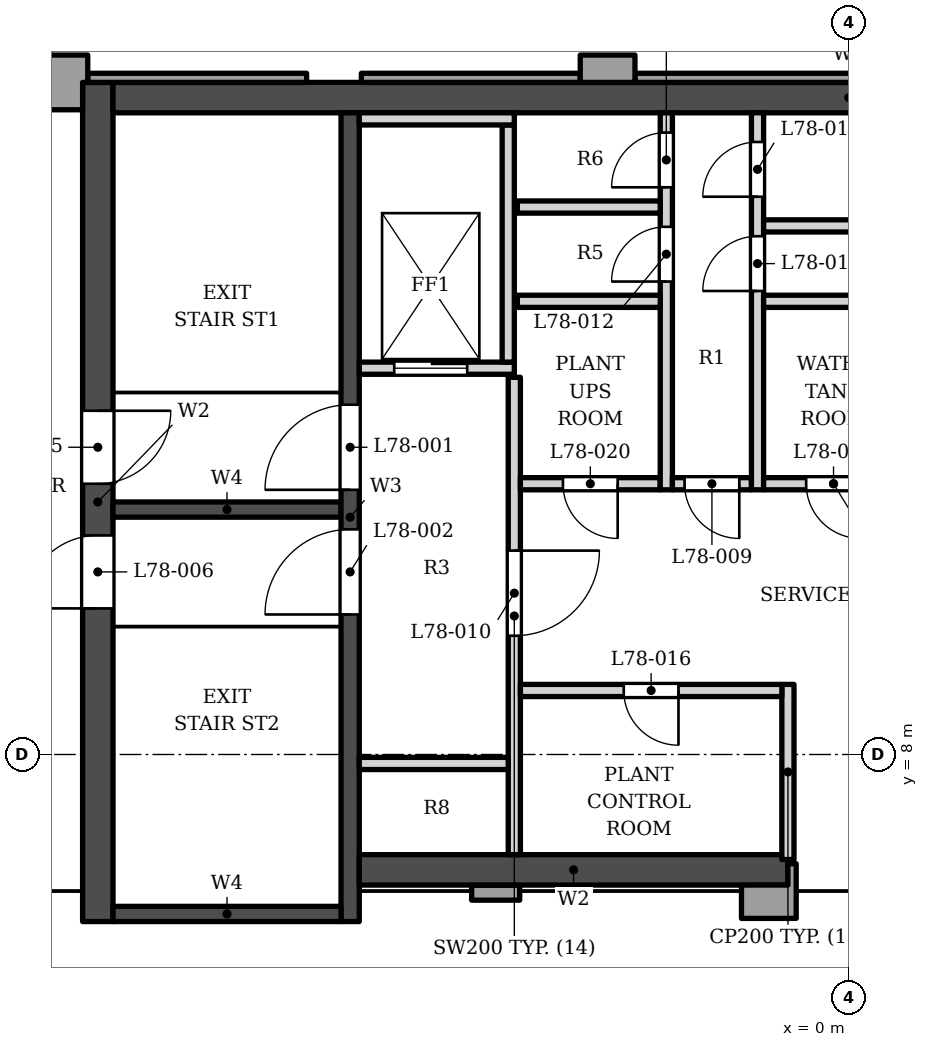
"""IFC4 building model, lengths in metres.
Left out: names, types, materials, properties, quantities, classifications, styles, units other than length and angle.
Written with IfcOpenShell. Run it as: python <this file> out.ifc"""

import sys

from ifc_helpers import new_model, si_unit, direction, frame, frame_2d, origin, place, context, subcontext, project, spatial, polyline, rectangle, outline, extrude, element, fill, save


model = new_model("IFC4")
c1 = context("Model", 3, precision=1e-05, world=origin(), true_north=direction((0.0, 1.0)))
c2 = subcontext(c1, "Body", "Model", "MODEL_VIEW")
j1 = project(units=[si_unit("LENGTHUNIT", "METRE"), si_unit("PLANEANGLEUNIT", "RADIAN")], contexts=[c1])
p1 = place(None, origin())
s1 = spatial("IfcSite", under=j1, at=p1, CompositionType="ELEMENT")
p2 = place(p1, origin())
s2 = spatial("IfcBuilding", under=s1, at=p2, CompositionType="ELEMENT")
p3 = place(p2, frame((0.0, 0.0, 335.5)))
s3 = spatial("IfcBuildingStorey", under=s2, at=p3, CompositionType="ELEMENT", Elevation=335.5)
p4 = place(p3, frame((-12.1, 18.802, 0.0), z_axis=(0.0, 0.0, 1.0), x_axis=(1.0, 0.0, 0.0)))
e1 = element("IfcWall", 1, at=p4, inside=s3, PredefinedType="SHEAR", context=c2, shape_type="SweptSolid", body=[
    extrude(rectangle(XDim=24.2, YDim=0.5, at=frame_2d((12.1, 0.0))), origin(), (0.0, 0.0, 1.0), 5.0),
])
p5 = place(p3, frame((-12.35, 5.253, 0.0), z_axis=(0.0, 0.0, 1.0), x_axis=(0.0, 1.0, 0.0)))
e2 = element("IfcWall", 2, at=p5, inside=s3, PredefinedType="SHEAR", context=c2, shape_type="SweptSolid", body=[
    extrude(outline(polyline([(0.0, 0.0), (13.8, 0.0), (13.8, 5.0), (2.081, 5.0), (0.0, 3.254), (0.0, 0.0)])), frame((0.0, 0.25, 0.0), z_axis=(0.0, -1.0, 0.0), x_axis=(1.0, 0.0, 0.0)), (0.0, 0.0, 1.0), 0.5),
])
p6 = place(p5, frame((7.2, 0.0, 0.0)))
e3 = element("IfcOpeningElement", 3, at=p6, cuts=e2, PredefinedType="OPENING", context=c2, shape_type="SweptSolid", body=[
    extrude(rectangle(XDim=1.2, YDim=2.1, at=frame_2d((0.6, 1.05))), frame((0.0, 0.26, 0.0), z_axis=(0.0, -1.0, 0.0), x_axis=(1.0, 0.0, 0.0)), (0.0, 0.0, 1.0), 0.52),
])
p7 = place(p5, frame((5.15, 0.0, 0.0)))
e4 = element("IfcOpeningElement", 4, at=p7, cuts=e2, PredefinedType="OPENING", context=c2, shape_type="SweptSolid", body=[
    extrude(rectangle(XDim=1.2, YDim=2.1, at=frame_2d((0.6, 1.05))), frame((0.0, 0.26, 0.0), z_axis=(0.0, -1.0, 0.0), x_axis=(1.0, 0.0, 0.0)), (0.0, 0.0, 1.0), 0.52),
])
p8 = place(p3, frame((-8.2, 5.253, 0.0), z_axis=(0.0, 0.0, 1.0), x_axis=(0.0, 1.0, 0.0)))
e5 = element("IfcWall", 5, at=p8, inside=s3, PredefinedType="SHEAR", context=c2, shape_type="SweptSolid", body=[
    extrude(outline(polyline([(0.0, 0.0), (13.3, 0.0), (13.3, 5.0), (2.081, 5.0), (0.0, 3.254), (0.0, 0.0)])), frame((0.0, 0.15, 0.0), z_axis=(0.0, -1.0, 0.0), x_axis=(1.0, 0.0, 0.0)), (0.0, 0.0, 1.0), 0.3),
])
p9 = place(p8, frame((7.1, 0.0, 0.0)))
e6 = element("IfcOpeningElement", 6, at=p9, cuts=e5, PredefinedType="OPENING", context=c2, shape_type="SweptSolid", body=[
    extrude(rectangle(XDim=1.4, YDim=2.1, at=frame_2d((0.7, 1.05))), frame((0.0, 0.16, 0.0), z_axis=(0.0, -1.0, 0.0), x_axis=(1.0, 0.0, 0.0)), (0.0, 0.0, 1.0), 0.32),
])
p10 = place(p8, frame((5.05, 0.0, 0.0)))
e7 = element("IfcOpeningElement", 7, at=p10, cuts=e5, PredefinedType="OPENING", context=c2, shape_type="SweptSolid", body=[
    extrude(rectangle(XDim=1.4, YDim=2.1, at=frame_2d((0.7, 1.05))), frame((0.0, 0.16, 0.0), z_axis=(0.0, -1.0, 0.0), x_axis=(1.0, 0.0, 0.0)), (0.0, 0.0, 1.0), 0.32),
])
p11 = place(p3, frame((-12.1, 12.028, 0.0), z_axis=(0.0, 0.0, 1.0), x_axis=(1.0, 0.0, 0.0)))
e8 = element("IfcWall", 8, at=p11, inside=s3, PredefinedType="SHEAR", context=c2, shape_type="SweptSolid", body=[
    extrude(rectangle(XDim=3.75, YDim=0.25, at=frame_2d((1.875, 0.0))), origin(), (0.0, 0.0, 1.0), 5.0),
])
p12 = place(p3, frame((-12.1, 5.378, 0.0), z_axis=(0.0, 0.0, 1.0), x_axis=(1.0, 0.0, 0.0)))
e9 = element("IfcWall", 9, at=p12, inside=s3, PredefinedType="SHEAR", context=c2, shape_type="SweptSolid", body=[
    extrude(rectangle(XDim=3.75, YDim=0.25, at=frame_2d((1.875, 0.0))), origin(), (0.0, 0.0, 1.0), 3.254),
])
p13 = place(p3, frame((-8.05, 6.103, 0.0), z_axis=(0.0, 0.0, 1.0), x_axis=(1.0, 0.0, 0.0)))
e10 = element("IfcWall", 10, at=p13, inside=s3, PredefinedType="SHEAR", context=c2, shape_type="SweptSolid", body=[
    extrude(rectangle(XDim=7.05, YDim=0.5, at=frame_2d((3.525, 0.0))), origin(), (0.0, 0.0, 1.0), 3.758),
])
p14 = place(p3, origin())
e11 = element("IfcWall", 11, at=p14, inside=s3, PredefinedType="SOLIDWALL", context=c2, shape_type="SweptSolid", body=[
    extrude(outline(polyline([(-0.864, 5.304), (-0.864, 6.204), (-1.0, 6.204), (-1.0, 5.853), (-1.764, 5.853), (-1.764, 5.304), (-0.864, 5.304)])), origin(), (0.0, 0.0, 1.0), 3.297),
])
p15 = place(p3, origin())
e12 = element("IfcWall", 12, at=p15, inside=s3, PredefinedType="SOLIDWALL", context=c2, shape_type="SweptSolid", body=[
    extrude(outline(polyline([(-4.416, 19.502), (-4.416, 19.052), (-3.516, 19.052), (-3.516, 19.502), (-4.416, 19.502)])), origin(), (0.0, 0.0, 1.0), 3.8),
])
p16 = place(p3, origin())
e13 = element("IfcWall", 13, at=p16, inside=s3, PredefinedType="SOLIDWALL", context=c2, shape_type="SweptSolid", body=[
    extrude(outline(polyline([(-13.416, 19.502), (-13.416, 18.603), (-12.6, 18.603), (-12.6, 19.052), (-12.516, 19.052), (-12.516, 19.502), (-13.416, 19.502)])), origin(), (0.0, 0.0, 1.0), 3.8),
])
p17 = place(p3, origin())
e14 = element("IfcWall", 14, at=p17, inside=s3, PredefinedType="ELEMENTEDWALL", context=c2, shape_type="SweptSolid", body=[
    extrude(outline(polyline([(0.084, 19.203), (-3.516, 19.203), (-3.516, 19.052), (0.084, 19.052), (0.084, 19.203)])), origin(), (0.0, 0.0, 1.0), 3.8),
])
p18 = place(p3, origin())
e15 = element("IfcWall", 15, at=p18, inside=s3, PredefinedType="ELEMENTEDWALL", context=c2, shape_type="SweptSolid", body=[
    extrude(outline(polyline([(-4.416, 19.203), (-8.016, 19.203), (-8.016, 19.052), (-4.416, 19.052), (-4.416, 19.203)])), origin(), (0.0, 0.0, 1.0), 3.8),
])
p19 = place(p3, origin())
e16 = element("IfcWall", 16, at=p19, inside=s3, PredefinedType="ELEMENTEDWALL", context=c2, shape_type="SweptSolid", body=[
    extrude(outline(polyline([(-8.916, 19.203), (-12.516, 19.203), (-12.516, 19.052), (-8.916, 19.052), (-8.916, 19.203)])), origin(), (0.0, 0.0, 1.0), 3.8),
])
p20 = place(p3, frame((-4.416, 19.278, 3.8), z_axis=(0.0, 0.0, 1.0), x_axis=(1.0, 0.0, 0.0)))
e17 = element("IfcWall", 17, at=p20, inside=s3, PredefinedType="ELEMENTEDWALL", context=c2, shape_type="SweptSolid", body=[
    extrude(rectangle(XDim=0.9, YDim=0.45, at=frame_2d((0.45, 0.0))), origin(), (0.0, 0.0, 1.0), 10.851),
])
p21 = place(p3, frame((-6.202, 5.727, 0.0), z_axis=(0.0, 0.0, 1.0), x_axis=(1.0, 0.0, 0.0)))
e18 = element("IfcWall", 18, at=p21, inside=s3, PredefinedType="ELEMENTEDWALL", context=c2, shape_type="SweptSolid", body=[
    extrude(rectangle(XDim=0.79, YDim=0.244, at=frame_2d((0.395, 0.0))), origin(), (0.0, 0.0, 1.0), 3.279),
])
p22 = place(p3, frame((-1.0, 6.273, 0.0), z_axis=(0.0, 0.0, 1.0), x_axis=(0.0, 1.0, 0.0)))
e19 = element("IfcWall", 19, at=p22, inside=s3, PredefinedType="PARTITIONING", context=c2, shape_type="SweptSolid", body=[
    extrude(outline(polyline([(0.0, 0.0), (2.88, 0.0), (2.88, 4.7), (0.703, 4.7), (0.0, 4.11), (0.0, 0.0)])), frame((0.0, 0.1, 0.0), z_axis=(0.0, -1.0, 0.0), x_axis=(1.0, 0.0, 0.0)), (0.0, 0.0, 1.0), 0.2),
])
p23 = place(p3, frame((-5.5, 6.353, 0.0), z_axis=(0.0, 0.0, 1.0), x_axis=(0.0, 1.0, 0.0)))
e20 = element("IfcWall", 20, at=p23, inside=s3, PredefinedType="SOLIDWALL", context=c2, shape_type="SweptSolid", body=[
    extrude(outline(polyline([(0.0, 0.0), (7.85, 0.0), (7.85, 4.7), (0.623, 4.7), (0.0, 4.177), (0.0, 0.0)])), frame((0.0, 0.1, 0.0), z_axis=(0.0, -1.0, 0.0), x_axis=(1.0, 0.0, 0.0)), (0.0, 0.0, 1.0), 0.2),
])
p24 = place(p23, frame((3.6, 0.0, 0.0)))
e21 = element("IfcOpeningElement", 21, at=p24, cuts=e20, PredefinedType="OPENING", context=c2, shape_type="SweptSolid", body=[
    extrude(rectangle(XDim=1.4, YDim=2.1, at=frame_2d((0.7, 1.05))), frame((0.0, 0.11, 0.0), z_axis=(0.0, -1.0, 0.0), x_axis=(1.0, 0.0, 0.0)), (0.0, 0.0, 1.0), 0.22),
])
p25 = place(p3, frame((-8.05, 7.853, 0.0), z_axis=(0.0, 0.0, 1.0), x_axis=(1.0, 0.0, 0.0)))
e22 = element("IfcWall", 22, at=p25, inside=s3, PredefinedType="SOLIDWALL", context=c2, shape_type="SweptSolid", body=[
    extrude(rectangle(XDim=2.45, YDim=0.2, at=frame_2d((1.225, 0.0))), origin(), (0.0, 0.0, 1.0), 4.7),
])
p26 = place(p3, frame((-5.4, 9.052, 0.0), z_axis=(0.0, 0.0, 1.0), x_axis=(1.0, 0.0, 0.0)))
e23 = element("IfcWall", 23, at=p26, inside=s3, PredefinedType="PARTITIONING", context=c2, shape_type="SweptSolid", body=[
    extrude(rectangle(XDim=4.3, YDim=0.2, at=frame_2d((2.15, 0.0))), origin(), (0.0, 0.0, 1.0), 4.7),
])
p27 = place(p26, frame((1.7, 0.0, 0.0)))
e24 = element("IfcOpeningElement", 24, at=p27, cuts=e23, PredefinedType="OPENING", context=c2, shape_type="SweptSolid", body=[
    extrude(rectangle(XDim=0.9, YDim=2.1, at=frame_2d((0.45, 1.05))), frame((0.0, 0.11, 0.0), z_axis=(0.0, -1.0, 0.0), x_axis=(1.0, 0.0, 0.0)), (0.0, 0.0, 1.0), 0.22),
])
p28 = place(p3, frame((-5.4, 12.453, 0.0), z_axis=(0.0, 0.0, 1.0), x_axis=(1.0, 0.0, 0.0)))
e25 = element("IfcWall", 25, at=p28, inside=s3, PredefinedType="PARTITIONING", context=c2, shape_type="SweptSolid", body=[
    extrude(rectangle(XDim=2.3, YDim=0.2, at=frame_2d((1.15, 0.0))), origin(), (0.0, 0.0, 1.0), 4.7),
])
p29 = place(p28, frame((0.7, 0.0, 0.0)))
e26 = element("IfcOpeningElement", 26, at=p29, cuts=e25, PredefinedType="OPENING", context=c2, shape_type="SweptSolid", body=[
    extrude(rectangle(XDim=0.9, YDim=2.1, at=frame_2d((0.45, 1.05))), frame((0.0, 0.11, 0.0), z_axis=(0.0, -1.0, 0.0), x_axis=(1.0, 0.0, 0.0)), (0.0, 0.0, 1.0), 0.22),
])
p30 = place(p3, frame((-3.0, 12.353, 0.0), z_axis=(0.0, 0.0, 1.0), x_axis=(0.0, 1.0, 0.0)))
e27 = element("IfcWall", 27, at=p30, inside=s3, PredefinedType="PARTITIONING", context=c2, shape_type="SweptSolid", body=[
    extrude(rectangle(XDim=6.2, YDim=0.2, at=frame_2d((3.1, 0.0))), origin(), (0.0, 0.0, 1.0), 4.7),
])
p31 = place(p30, frame((3.425, 0.0, 0.0)))
e28 = element("IfcOpeningElement", 28, at=p31, cuts=e27, PredefinedType="OPENING", context=c2, shape_type="SweptSolid", body=[
    extrude(rectangle(XDim=0.9, YDim=2.1, at=frame_2d((0.45, 1.05))), frame((0.0, 0.11, 0.0), z_axis=(0.0, -1.0, 0.0), x_axis=(1.0, 0.0, 0.0)), (0.0, 0.0, 1.0), 0.22),
])
p32 = place(p30, frame((4.975, 0.0, 0.0)))
e29 = element("IfcOpeningElement", 29, at=p32, cuts=e27, PredefinedType="OPENING", context=c2, shape_type="SweptSolid", body=[
    extrude(rectangle(XDim=0.9, YDim=2.1, at=frame_2d((0.45, 1.05))), frame((0.0, 0.11, 0.0), z_axis=(0.0, -1.0, 0.0), x_axis=(1.0, 0.0, 0.0)), (0.0, 0.0, 1.0), 0.22),
])
p33 = place(p3, frame((-2.9, 12.453, 0.0), z_axis=(0.0, 0.0, 1.0), x_axis=(1.0, 0.0, 0.0)))
e30 = element("IfcWall", 30, at=p33, inside=s3, PredefinedType="PARTITIONING", context=c2, shape_type="SweptSolid", body=[
    extrude(rectangle(XDim=1.3, YDim=0.2, at=frame_2d((0.65, 0.0))), origin(), (0.0, 0.0, 1.0), 4.7),
])
p34 = place(p33, frame((0.2, 0.0, 0.0)))
e31 = element("IfcOpeningElement", 31, at=p34, cuts=e30, PredefinedType="OPENING", context=c2, shape_type="SweptSolid", body=[
    extrude(rectangle(XDim=0.9, YDim=2.1, at=frame_2d((0.45, 1.05))), frame((0.0, 0.11, 0.0), z_axis=(0.0, -1.0, 0.0), x_axis=(1.0, 0.0, 0.0)), (0.0, 0.0, 1.0), 0.22),
])
p35 = place(p3, frame((-1.5, 12.353, 0.0), z_axis=(0.0, 0.0, 1.0), x_axis=(0.0, 1.0, 0.0)))
e32 = element("IfcWall", 32, at=p35, inside=s3, PredefinedType="PARTITIONING", context=c2, shape_type="SweptSolid", body=[
    extrude(rectangle(XDim=6.2, YDim=0.2, at=frame_2d((3.1, 0.0))), origin(), (0.0, 0.0, 1.0), 4.7),
])
p36 = place(p35, frame((3.27, 0.0, 0.0)))
e33 = element("IfcOpeningElement", 33, at=p36, cuts=e32, PredefinedType="OPENING", context=c2, shape_type="SweptSolid", body=[
    extrude(rectangle(XDim=0.9, YDim=2.1, at=frame_2d((0.45, 1.05))), frame((0.0, 0.11, 0.0), z_axis=(0.0, -1.0, 0.0), x_axis=(1.0, 0.0, 0.0)), (0.0, 0.0, 1.0), 0.22),
])
p37 = place(p35, frame((4.82, 0.0, 0.0)))
e34 = element("IfcOpeningElement", 34, at=p37, cuts=e32, PredefinedType="OPENING", context=c2, shape_type="SweptSolid", body=[
    extrude(rectangle(XDim=0.9, YDim=2.1, at=frame_2d((0.45, 1.05))), frame((0.0, 0.11, 0.0), z_axis=(0.0, -1.0, 0.0), x_axis=(1.0, 0.0, 0.0)), (0.0, 0.0, 1.0), 0.22),
])
p38 = place(p3, frame((-1.4, 12.453, 0.0), z_axis=(0.0, 0.0, 1.0), x_axis=(1.0, 0.0, 0.0)))
e35 = element("IfcWall", 35, at=p38, inside=s3, PredefinedType="PARTITIONING", context=c2, shape_type="SweptSolid", body=[
    extrude(rectangle(XDim=2.3, YDim=0.2, at=frame_2d((1.15, 0.0))), origin(), (0.0, 0.0, 1.0), 4.7),
])
p39 = place(p38, frame((0.7, 0.0, 0.0)))
e36 = element("IfcOpeningElement", 36, at=p39, cuts=e35, PredefinedType="OPENING", context=c2, shape_type="SweptSolid", body=[
    extrude(rectangle(XDim=0.9, YDim=2.1, at=frame_2d((0.45, 1.05))), frame((0.0, 0.11, 0.0), z_axis=(0.0, -1.0, 0.0), x_axis=(1.0, 0.0, 0.0)), (0.0, 0.0, 1.0), 0.22),
])
p40 = place(p3, frame((-8.05, 14.353, 0.0), z_axis=(0.0, 0.0, 1.0), x_axis=(1.0, 0.0, 0.0)))
e37 = element("IfcWall", 37, at=p40, inside=s3, PredefinedType="SOLIDWALL", context=c2, shape_type="SweptSolid", body=[
    extrude(rectangle(XDim=2.55, YDim=0.2, at=frame_2d((1.275, 0.0))), origin(), (0.0, 0.0, 1.0), 4.7),
])
p41 = place(p40, frame((0.575, 0.0, 0.0)))
e38 = element("IfcOpeningElement", 38, at=p41, cuts=e37, PredefinedType="OPENING", context=c2, shape_type="SweptSolid", body=[
    extrude(rectangle(XDim=1.2, YDim=2.1, at=frame_2d((0.6, 1.05))), frame((0.0, 0.11, 0.0), z_axis=(0.0, -1.0, 0.0), x_axis=(1.0, 0.0, 0.0)), (0.0, 0.0, 1.0), 0.22),
])
p42 = place(p3, frame((-5.6, 14.453, 0.0), z_axis=(0.0, 0.0, 1.0), x_axis=(0.0, 1.0, 0.0)))
e39 = element("IfcWall", 39, at=p42, inside=s3, PredefinedType="SOLIDWALL", context=c2, shape_type="SweptSolid", body=[
    extrude(rectangle(XDim=3.9, YDim=0.2, at=frame_2d((1.95, 0.0))), origin(), (0.0, 0.0, 1.0), 4.7),
])
p43 = place(p3, frame((-5.45, 15.453, 0.0), z_axis=(0.0, 0.0, 1.0), x_axis=(1.0, 0.0, 0.0)))
e40 = element("IfcWall", 40, at=p43, inside=s3, PredefinedType="SOLIDWALL", context=c2, shape_type="SweptSolid", body=[
    extrude(rectangle(XDim=2.35, YDim=0.2, at=frame_2d((1.175, 0.0))), origin(), (0.0, 0.0, 1.0), 4.7),
])
p44 = place(p3, frame((-1.4, 15.453, 0.0), z_axis=(0.0, 0.0, 1.0), x_axis=(1.0, 0.0, 0.0)))
e41 = element("IfcWall", 41, at=p44, inside=s3, PredefinedType="PARTITIONING", context=c2, shape_type="SweptSolid", body=[
    extrude(rectangle(XDim=2.3, YDim=0.2, at=frame_2d((1.15, 0.0))), origin(), (0.0, 0.0, 1.0), 4.7),
])
p45 = place(p3, frame((-1.4, 16.693, 0.0), z_axis=(0.0, 0.0, 1.0), x_axis=(1.0, 0.0, 0.0)))
e42 = element("IfcWall", 42, at=p45, inside=s3, PredefinedType="SOLIDWALL", context=c2, shape_type="SweptSolid", body=[
    extrude(rectangle(XDim=6.85, YDim=0.2, at=frame_2d((3.425, 0.0))), origin(), (0.0, 0.0, 1.0), 4.7),
])
p46 = place(p3, frame((-5.45, 17.003, 0.0), z_axis=(0.0, 0.0, 1.0), x_axis=(1.0, 0.0, 0.0)))
e43 = element("IfcWall", 43, at=p46, inside=s3, PredefinedType="SOLIDWALL", context=c2, shape_type="SweptSolid", body=[
    extrude(rectangle(XDim=2.35, YDim=0.2, at=frame_2d((1.175, 0.0))), origin(), (0.0, 0.0, 1.0), 4.7),
])
p47 = place(p3, frame((-8.05, 18.453, 0.0), z_axis=(0.0, 0.0, 1.0), x_axis=(1.0, 0.0, 0.0)))
e44 = element("IfcWall", 44, at=p47, inside=s3, PredefinedType="SOLIDWALL", context=c2, shape_type="SweptSolid", body=[
    extrude(rectangle(XDim=2.55, YDim=0.2, at=frame_2d((1.275, 0.0))), origin(), (0.0, 0.0, 1.0), 4.7),
])
p48 = place(p41, origin())
e45 = element("IfcDoor", 45, at=p48, inside=s3, OperationType="DOUBLE_DOOR_SLIDING", PredefinedType="DOOR", context=c2, shape_type="SweptSolid", body=[
    extrude(rectangle(XDim=1.2, YDim=2.1, at=frame_2d((0.6, 1.05))), frame((0.0, 0.025, 0.0), z_axis=(0.0, -1.0, 0.0), x_axis=(1.0, 0.0, 0.0)), (0.0, 0.0, 1.0), 0.05),
])
fill(e38, e45)
p49 = place(p9, origin())
e46 = element("IfcDoor", 46, at=p49, inside=s3, OperationType="SINGLE_SWING_LEFT", PredefinedType="DOOR", context=c2, shape_type="SweptSolid", body=[
    extrude(rectangle(XDim=1.4, YDim=2.1, at=frame_2d((0.7, 1.05))), frame((0.0, 0.025, 0.0), z_axis=(0.0, -1.0, 0.0), x_axis=(1.0, 0.0, 0.0)), (0.0, 0.0, 1.0), 0.05),
])
fill(e6, e46)
p50 = place(p10, origin())
e47 = element("IfcDoor", 47, at=p50, inside=s3, OperationType="SINGLE_SWING_LEFT", PredefinedType="DOOR", context=c2, shape_type="SweptSolid", body=[
    extrude(rectangle(XDim=1.4, YDim=2.1, at=frame_2d((0.7, 1.05))), frame((0.0, 0.025, 0.0), z_axis=(0.0, -1.0, 0.0), x_axis=(1.0, 0.0, 0.0)), (0.0, 0.0, 1.0), 0.05),
])
fill(e7, e47)
p51 = place(p6, origin())
e48 = element("IfcDoor", 48, at=p51, inside=s3, OperationType="SINGLE_SWING_RIGHT", PredefinedType="DOOR", context=c2, shape_type="SweptSolid", body=[
    extrude(rectangle(XDim=1.2, YDim=2.1, at=frame_2d((0.6, 1.05))), frame((0.0, 0.025, 0.0), z_axis=(0.0, -1.0, 0.0), x_axis=(1.0, 0.0, 0.0)), (0.0, 0.0, 1.0), 0.05),
])
fill(e3, e48)
p52 = place(p7, origin())
e49 = element("IfcDoor", 49, at=p52, inside=s3, OperationType="SINGLE_SWING_LEFT", PredefinedType="DOOR", context=c2, shape_type="SweptSolid", body=[
    extrude(rectangle(XDim=1.2, YDim=2.1, at=frame_2d((0.6, 1.05))), frame((0.0, 0.025, 0.0), z_axis=(0.0, -1.0, 0.0), x_axis=(1.0, 0.0, 0.0)), (0.0, 0.0, 1.0), 0.05),
])
fill(e4, e49)
p53 = place(p34, origin())
e50 = element("IfcDoor", 50, at=p53, inside=s3, OperationType="SINGLE_SWING_RIGHT", PredefinedType="DOOR", context=c2, shape_type="SweptSolid", body=[
    extrude(rectangle(XDim=0.9, YDim=2.1, at=frame_2d((0.45, 1.05))), frame((0.0, 0.025, 0.0), z_axis=(0.0, -1.0, 0.0), x_axis=(1.0, 0.0, 0.0)), (0.0, 0.0, 1.0), 0.05),
])
fill(e31, e50)
p54 = place(p24, origin())
e51 = element("IfcDoor", 51, at=p54, inside=s3, OperationType="SINGLE_SWING_RIGHT", PredefinedType="DOOR", context=c2, shape_type="SweptSolid", body=[
    extrude(rectangle(XDim=1.4, YDim=2.1, at=frame_2d((0.7, 1.05))), frame((0.0, 0.025, 0.0), z_axis=(0.0, -1.0, 0.0), x_axis=(1.0, 0.0, 0.0)), (0.0, 0.0, 1.0), 0.05),
])
fill(e21, e51)
p55 = place(p31, origin())
e52 = element("IfcDoor", 52, at=p55, inside=s3, OperationType="SINGLE_SWING_LEFT", PredefinedType="DOOR", context=c2, shape_type="SweptSolid", body=[
    extrude(rectangle(XDim=0.9, YDim=2.1, at=frame_2d((0.45, 1.05))), frame((0.0, 0.025, 0.0), z_axis=(0.0, -1.0, 0.0), x_axis=(1.0, 0.0, 0.0)), (0.0, 0.0, 1.0), 0.05),
])
fill(e28, e52)
p56 = place(p32, origin())
e53 = element("IfcDoor", 53, at=p56, inside=s3, OperationType="SINGLE_SWING_LEFT", PredefinedType="DOOR", context=c2, shape_type="SweptSolid", body=[
    extrude(rectangle(XDim=0.9, YDim=2.1, at=frame_2d((0.45, 1.05))), frame((0.0, 0.025, 0.0), z_axis=(0.0, -1.0, 0.0), x_axis=(1.0, 0.0, 0.0)), (0.0, 0.0, 1.0), 0.05),
])
fill(e29, e53)
p57 = place(p36, origin())
e54 = element("IfcDoor", 54, at=p57, inside=s3, OperationType="SINGLE_SWING_LEFT", PredefinedType="DOOR", context=c2, shape_type="SweptSolid", body=[
    extrude(rectangle(XDim=0.9, YDim=2.1, at=frame_2d((0.45, 1.05))), frame((0.0, 0.025, 0.0), z_axis=(0.0, -1.0, 0.0), x_axis=(1.0, 0.0, 0.0)), (0.0, 0.0, 1.0), 0.05),
])
fill(e33, e54)
p58 = place(p37, origin())
e55 = element("IfcDoor", 55, at=p58, inside=s3, OperationType="SINGLE_SWING_LEFT", PredefinedType="DOOR", context=c2, shape_type="SweptSolid", body=[
    extrude(rectangle(XDim=0.9, YDim=2.1, at=frame_2d((0.45, 1.05))), frame((0.0, 0.025, 0.0), z_axis=(0.0, -1.0, 0.0), x_axis=(1.0, 0.0, 0.0)), (0.0, 0.0, 1.0), 0.05),
])
fill(e34, e55)
p59 = place(p27, origin())
e56 = element("IfcDoor", 56, at=p59, inside=s3, OperationType="SINGLE_SWING_RIGHT", PredefinedType="DOOR", context=c2, shape_type="SweptSolid", body=[
    extrude(rectangle(XDim=0.9, YDim=2.1, at=frame_2d((0.45, 1.05))), frame((0.0, 0.025, 0.0), z_axis=(0.0, -1.0, 0.0), x_axis=(1.0, 0.0, 0.0)), (0.0, 0.0, 1.0), 0.05),
])
fill(e24, e56)
p60 = place(p29, origin())
e57 = element("IfcDoor", 57, at=p60, inside=s3, OperationType="SINGLE_SWING_RIGHT", PredefinedType="DOOR", context=c2, shape_type="SweptSolid", body=[
    extrude(rectangle(XDim=0.9, YDim=2.1, at=frame_2d((0.45, 1.05))), frame((0.0, 0.025, 0.0), z_axis=(0.0, -1.0, 0.0), x_axis=(1.0, 0.0, 0.0)), (0.0, 0.0, 1.0), 0.05),
])
fill(e26, e57)
p61 = place(p39, origin())
e58 = element("IfcDoor", 58, at=p61, inside=s3, OperationType="SINGLE_SWING_RIGHT", PredefinedType="DOOR", context=c2, shape_type="SweptSolid", body=[
    extrude(rectangle(XDim=0.9, YDim=2.1, at=frame_2d((0.45, 1.05))), frame((0.0, 0.025, 0.0), z_axis=(0.0, -1.0, 0.0), x_axis=(1.0, 0.0, 0.0)), (0.0, 0.0, 1.0), 0.05),
])
fill(e36, e58)
save(model, sys.argv[1])
